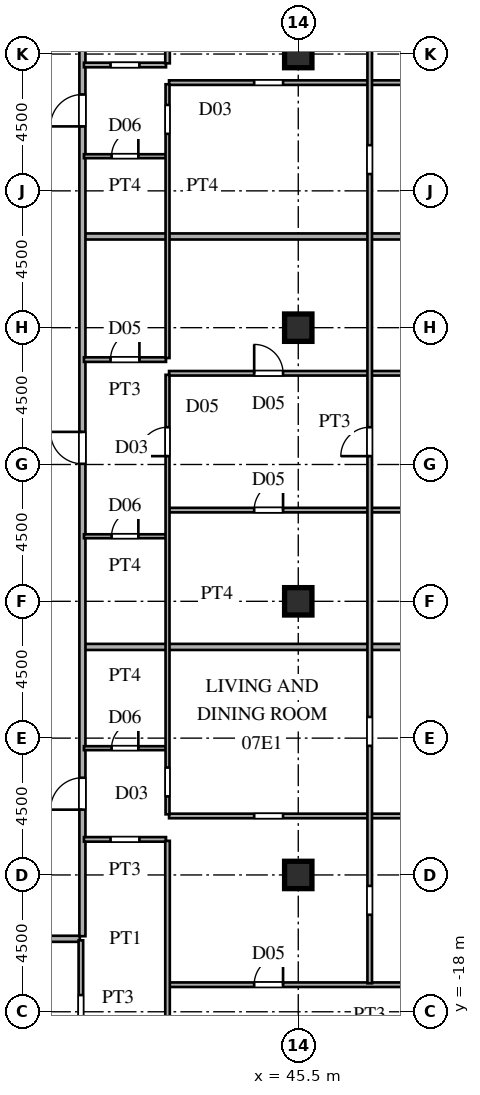
"""IFC4 building model, lengths in metres.
Left out: names, types, materials, properties, quantities, classifications, styles, units other than length and angle.
Written with IfcOpenShell. Run it as: python <this file> out.ifc"""

import sys

from ifc_helpers import new_model, si_unit, direction, frame, frame_2d, origin, origin_2d, place, context, subcontext, project, spatial, rectangle, i_section, extrude, source, transform, mapped, element, fill, save


model = new_model("IFC4")
c1 = context("Model", 3, precision=1e-05, world=origin(), true_north=direction((0.0, 1.0)))
c2 = subcontext(c1, "Body", "Model", "MODEL_VIEW")
j1 = project(units=[si_unit("LENGTHUNIT", "METRE"), si_unit("PLANEANGLEUNIT", "RADIAN")], contexts=[c1])
p1 = place(None, origin())
s1 = spatial("IfcSite", under=j1, at=p1, CompositionType="ELEMENT")
p2 = place(p1, origin())
s2 = spatial("IfcBuilding", under=s1, at=p2, CompositionType="ELEMENT")
p3 = place(p2, frame((0.0, 0.0, 29.7)))
s3 = spatial("IfcBuildingStorey", under=s2, at=p3, CompositionType="ELEMENT", Elevation=29.7)
m1 = source(origin(), c2, "Body", "SweptSolid", [
    extrude(i_section(OverallWidth=0.9, OverallDepth=0.9, WebThickness=0.036, FlangeThickness=0.055, at=origin_2d()), origin(), (0.0, 0.0, 1.0), 3.6),
])
for number, where, z_axis, x_axis in (
    (1, (45.5, -13.5, 0.0), (0.0, 0.0, 1.0), (1.0, 0.0, 0.0)),
    (2, (45.5, -4.5, 0.0), (0.0, 0.0, 1.0), (1.0, 0.0, 0.0)),
    (3, (45.5, 4.5, 0.0), (0.0, 0.0, 1.0), (1.0, 0.0, 0.0)),
    (4, (45.5, 13.5, 0.0), (0.0, 0.0, 1.0), (1.0, 0.0, 0.0)),
):
    element("IfcColumn", number, at=place(p3, frame(where, z_axis=z_axis, x_axis=x_axis)), inside=s3, PredefinedType="COLUMN", context=c2, shape_type="MappedRepresentation", body=[
        mapped(m1, transform((0.0, 0.0, 0.0), scale=1.0)),
    ])
p4 = place(p3, frame((41.25, -17.11, 0.0), z_axis=(0.0, 0.0, 1.0), x_axis=(1.0, 0.0, 0.0)))
e5 = element("IfcWall", 5, at=p4, inside=s3, PredefinedType="PARTITIONING", context=c2, shape_type="SweptSolid", body=[
    extrude(rectangle(XDim=13.2, YDim=0.15, at=frame_2d((6.6, 0.0))), origin(), (0.0, 0.0, 1.0), 3.38),
])
p5 = place(p4, frame((2.8, 0.0, 0.0)))
e6 = element("IfcOpeningElement", 6, at=p5, cuts=e5, PredefinedType="OPENING", context=c2, shape_type="SweptSolid", body=[
    extrude(rectangle(XDim=0.95, YDim=2.15, at=frame_2d((0.475, 1.075))), frame((0.0, 0.085, 0.0), z_axis=(0.0, -1.0, 0.0), x_axis=(1.0, 0.0, 0.0)), (0.0, 0.0, 1.0), 0.17),
])
p6 = place(p3, frame((36.585, -15.6, 0.0), z_axis=(0.0, 0.0, 1.0), x_axis=(1.0, 0.0, 0.0)))
e7 = element("IfcWall", 7, at=p6, inside=s3, PredefinedType="PARTITIONING", context=c2, shape_type="SweptSolid", body=[
    extrude(rectangle(XDim=1.73, YDim=0.2, at=frame_2d((0.865, 0.0))), origin(), (0.0, 0.0, 1.0), 3.38),
])
p7 = place(p3, frame((38.45, -12.33, 0.0), z_axis=(0.0, 0.0, 1.0), x_axis=(1.0, 0.0, 0.0)))
e8 = element("IfcWall", 8, at=p7, inside=s3, PredefinedType="PARTITIONING", context=c2, shape_type="SweptSolid", body=[
    extrude(rectangle(XDim=2.7, YDim=0.15, at=frame_2d((1.35, 0.0))), origin(), (0.0, 0.0, 1.0), 3.38),
])
p8 = place(p7, frame((0.875, 0.0, 0.0)))
e9 = element("IfcOpeningElement", 9, at=p8, cuts=e8, PredefinedType="OPENING", context=c2, shape_type="SweptSolid", body=[
    extrude(rectangle(XDim=0.95, YDim=2.15, at=frame_2d((0.475, 1.075))), frame((0.0, 0.085, 0.0), z_axis=(0.0, -1.0, 0.0), x_axis=(1.0, 0.0, 0.0)), (0.0, 0.0, 1.0), 0.17),
])
p9 = place(p3, frame((41.25, -11.56, 0.0), z_axis=(0.0, 0.0, 1.0), x_axis=(1.0, 0.0, 0.0)))
e10 = element("IfcWall", 10, at=p9, inside=s3, PredefinedType="PARTITIONING", context=c2, shape_type="SweptSolid", body=[
    extrude(rectangle(XDim=27.44, YDim=0.15, at=frame_2d((13.72, 0.0))), origin(), (0.0, 0.0, 1.0), 3.38),
])
p10 = place(p9, frame((2.8, 0.0, 0.0)))
e11 = element("IfcOpeningElement", 11, at=p10, cuts=e10, PredefinedType="OPENING", context=c2, shape_type="SweptSolid", body=[
    extrude(rectangle(XDim=0.95, YDim=2.15, at=frame_2d((0.475, 1.075))), frame((0.0, 0.085, 0.0), z_axis=(0.0, -1.0, 0.0), x_axis=(1.0, 0.0, 0.0)), (0.0, 0.0, 1.0), 0.17),
])
p11 = place(p9, frame((15.625, 0.0, 0.0)))
e12 = element("IfcOpeningElement", 12, at=p11, cuts=e10, PredefinedType="OPENING", context=c2, shape_type="SweptSolid", body=[
    extrude(rectangle(XDim=0.95, YDim=2.15, at=frame_2d((0.475, 1.075))), frame((0.0, 0.085, 0.0), z_axis=(0.0, -1.0, 0.0), x_axis=(1.0, 0.0, 0.0)), (0.0, 0.0, 1.0), 0.17),
])
p12 = place(p3, frame((38.45, -9.33, 0.0), z_axis=(0.0, 0.0, 1.0), x_axis=(1.0, 0.0, 0.0)))
e13 = element("IfcWall", 13, at=p12, inside=s3, PredefinedType="PARTITIONING", context=c2, shape_type="SweptSolid", body=[
    extrude(rectangle(XDim=2.7, YDim=0.13, at=frame_2d((1.35, 0.0))), origin(), (0.0, 0.0, 1.0), 3.38),
])
p13 = place(p12, frame((0.91, 0.0, 0.0)))
e14 = element("IfcOpeningElement", 14, at=p13, cuts=e13, PredefinedType="OPENING", context=c2, shape_type="SweptSolid", body=[
    extrude(rectangle(XDim=0.88, YDim=2.1, at=frame_2d((0.44, 1.05))), frame((0.0, 0.075, 0.0), z_axis=(0.0, -1.0, 0.0), x_axis=(1.0, 0.0, 0.0)), (0.0, 0.0, 1.0), 0.15),
])
p14 = place(p3, frame((38.48, -6.0, 0.0), z_axis=(0.0, 0.0, 1.0), x_axis=(1.0, 0.0, 0.0)))
e15 = element("IfcWall", 15, at=p14, inside=s3, PredefinedType="PARTITIONING", context=c2, shape_type="SweptSolid", body=[
    extrude(rectangle(XDim=34.025, YDim=0.2, at=frame_2d((17.012, 0.0))), origin(), (0.0, 0.0, 1.0), 3.38),
])
p15 = place(p3, frame((38.45, -2.36, 0.0), z_axis=(0.0, 0.0, 1.0), x_axis=(1.0, 0.0, 0.0)))
e16 = element("IfcWall", 16, at=p15, inside=s3, PredefinedType="PARTITIONING", context=c2, shape_type="SweptSolid", body=[
    extrude(rectangle(XDim=2.7, YDim=0.13, at=frame_2d((1.35, 0.0))), origin(), (0.0, 0.0, 1.0), 3.38),
])
p16 = place(p15, frame((0.91, 0.0, 0.0)))
e17 = element("IfcOpeningElement", 17, at=p16, cuts=e16, PredefinedType="OPENING", context=c2, shape_type="SweptSolid", body=[
    extrude(rectangle(XDim=0.88, YDim=2.1, at=frame_2d((0.44, 1.05))), frame((0.0, 0.075, 0.0), z_axis=(0.0, -1.0, 0.0), x_axis=(1.0, 0.0, 0.0)), (0.0, 0.0, 1.0), 0.15),
])
p17 = place(p3, frame((41.25, -1.5, 0.0), z_axis=(0.0, 0.0, 1.0), x_axis=(1.0, 0.0, 0.0)))
e18 = element("IfcWall", 18, at=p17, inside=s3, PredefinedType="PARTITIONING", context=c2, shape_type="SweptSolid", body=[
    extrude(rectangle(XDim=31.285, YDim=0.15, at=frame_2d((15.643, 0.0))), origin(), (0.0, 0.0, 1.0), 3.38),
])
p18 = place(p17, frame((2.8, 0.0, 0.0)))
e19 = element("IfcOpeningElement", 19, at=p18, cuts=e18, PredefinedType="OPENING", context=c2, shape_type="SweptSolid", body=[
    extrude(rectangle(XDim=0.95, YDim=2.15, at=frame_2d((0.475, 1.075))), frame((0.0, 0.085, 0.0), z_axis=(0.0, -1.0, 0.0), x_axis=(1.0, 0.0, 0.0)), (0.0, 0.0, 1.0), 0.17),
])
p19 = place(p17, frame((15.625, 0.0, 0.0)))
e20 = element("IfcOpeningElement", 20, at=p19, cuts=e18, PredefinedType="OPENING", context=c2, shape_type="SweptSolid", body=[
    extrude(rectangle(XDim=0.95, YDim=2.15, at=frame_2d((0.475, 1.075))), frame((0.0, 0.085, 0.0), z_axis=(0.0, -1.0, 0.0), x_axis=(1.0, 0.0, 0.0)), (0.0, 0.0, 1.0), 0.17),
])
p20 = place(p3, frame((41.25, 3.0, 0.0), z_axis=(0.0, 0.0, 1.0), x_axis=(1.0, 0.0, 0.0)))
e21 = element("IfcWall", 21, at=p20, inside=s3, PredefinedType="PARTITIONING", context=c2, shape_type="SweptSolid", body=[
    extrude(rectangle(XDim=31.285, YDim=0.15, at=frame_2d((15.643, 0.0))), origin(), (0.0, 0.0, 1.0), 3.38),
])
p21 = place(p20, frame((2.8, 0.0, 0.0)))
e22 = element("IfcOpeningElement", 22, at=p21, cuts=e21, PredefinedType="OPENING", context=c2, shape_type="SweptSolid", body=[
    extrude(rectangle(XDim=0.95, YDim=2.15, at=frame_2d((0.475, 1.075))), frame((0.0, 0.085, 0.0), z_axis=(0.0, -1.0, 0.0), x_axis=(1.0, 0.0, 0.0)), (0.0, 0.0, 1.0), 0.17),
])
p22 = place(p20, frame((15.625, 0.0, 0.0)))
e23 = element("IfcOpeningElement", 23, at=p22, cuts=e21, PredefinedType="OPENING", context=c2, shape_type="SweptSolid", body=[
    extrude(rectangle(XDim=0.95, YDim=2.15, at=frame_2d((0.475, 1.075))), frame((0.0, 0.085, 0.0), z_axis=(0.0, -1.0, 0.0), x_axis=(1.0, 0.0, 0.0)), (0.0, 0.0, 1.0), 0.17),
])
p23 = place(p3, frame((38.45, 3.45, 0.0), z_axis=(0.0, 0.0, 1.0), x_axis=(1.0, 0.0, 0.0)))
e24 = element("IfcWall", 24, at=p23, inside=s3, PredefinedType="PARTITIONING", context=c2, shape_type="SweptSolid", body=[
    extrude(rectangle(XDim=2.7, YDim=0.15, at=frame_2d((1.35, 0.0))), origin(), (0.0, 0.0, 1.0), 3.38),
])
p24 = place(p23, frame((0.875, 0.0, 0.0)))
e25 = element("IfcOpeningElement", 25, at=p24, cuts=e24, PredefinedType="OPENING", context=c2, shape_type="SweptSolid", body=[
    extrude(rectangle(XDim=0.95, YDim=2.15, at=frame_2d((0.475, 1.075))), frame((0.0, 0.085, 0.0), z_axis=(0.0, -1.0, 0.0), x_axis=(1.0, 0.0, 0.0)), (0.0, 0.0, 1.0), 0.17),
])
p25 = place(p3, frame((38.48, 7.5, 0.0), z_axis=(0.0, 0.0, 1.0), x_axis=(1.0, 0.0, 0.0)))
e26 = element("IfcWall", 26, at=p25, inside=s3, PredefinedType="PARTITIONING", context=c2, shape_type="SweptSolid", body=[
    extrude(rectangle(XDim=34.025, YDim=0.2, at=frame_2d((17.012, 0.0))), origin(), (0.0, 0.0, 1.0), 3.38),
])
p26 = place(p3, frame((38.45, 10.14, 0.0), z_axis=(0.0, 0.0, 1.0), x_axis=(1.0, 0.0, 0.0)))
e27 = element("IfcWall", 27, at=p26, inside=s3, PredefinedType="PARTITIONING", context=c2, shape_type="SweptSolid", body=[
    extrude(rectangle(XDim=2.7, YDim=0.13, at=frame_2d((1.35, 0.0))), origin(), (0.0, 0.0, 1.0), 3.38),
])
p27 = place(p26, frame((0.91, 0.0, 0.0)))
e28 = element("IfcOpeningElement", 28, at=p27, cuts=e27, PredefinedType="OPENING", context=c2, shape_type="SweptSolid", body=[
    extrude(rectangle(XDim=0.88, YDim=2.1, at=frame_2d((0.44, 1.05))), frame((0.0, 0.075, 0.0), z_axis=(0.0, -1.0, 0.0), x_axis=(1.0, 0.0, 0.0)), (0.0, 0.0, 1.0), 0.15),
])
p28 = place(p3, frame((41.25, 12.56, 0.0), z_axis=(0.0, 0.0, 1.0), x_axis=(1.0, 0.0, 0.0)))
e29 = element("IfcWall", 29, at=p28, inside=s3, PredefinedType="PARTITIONING", context=c2, shape_type="SweptSolid", body=[
    extrude(rectangle(XDim=24.969, YDim=0.15, at=frame_2d((12.484, 0.0))), origin(), (0.0, 0.0, 1.0), 3.38),
])
p29 = place(p28, frame((2.8, 0.0, 0.0)))
e30 = element("IfcOpeningElement", 30, at=p29, cuts=e29, PredefinedType="OPENING", context=c2, shape_type="SweptSolid", body=[
    extrude(rectangle(XDim=0.95, YDim=2.15, at=frame_2d((0.475, 1.075))), frame((0.0, 0.085, 0.0), z_axis=(0.0, -1.0, 0.0), x_axis=(1.0, 0.0, 0.0)), (0.0, 0.0, 1.0), 0.17),
])
p30 = place(p28, frame((15.625, 0.0, 0.0)))
e31 = element("IfcOpeningElement", 31, at=p30, cuts=e29, PredefinedType="OPENING", context=c2, shape_type="SweptSolid", body=[
    extrude(rectangle(XDim=0.95, YDim=2.15, at=frame_2d((0.475, 1.075))), frame((0.0, 0.085, 0.0), z_axis=(0.0, -1.0, 0.0), x_axis=(1.0, 0.0, 0.0)), (0.0, 0.0, 1.0), 0.17),
])
p31 = place(p28, frame((9.45, 0.0, 0.0)))
e32 = element("IfcOpeningElement", 32, at=p31, cuts=e29, PredefinedType="OPENING", context=c2, shape_type="SweptSolid", body=[
    extrude(rectangle(XDim=0.95, YDim=2.15, at=frame_2d((0.475, 1.075))), frame((0.0, 0.085, 0.0), z_axis=(0.0, -1.0, 0.0), x_axis=(1.0, 0.0, 0.0)), (0.0, 0.0, 1.0), 0.17),
])
p32 = place(p3, frame((38.45, 13.14, 0.0), z_axis=(0.0, 0.0, 1.0), x_axis=(1.0, 0.0, 0.0)))
e33 = element("IfcWall", 33, at=p32, inside=s3, PredefinedType="PARTITIONING", context=c2, shape_type="SweptSolid", body=[
    extrude(rectangle(XDim=2.7, YDim=0.15, at=frame_2d((1.35, 0.0))), origin(), (0.0, 0.0, 1.0), 3.38),
])
p33 = place(p32, frame((0.875, 0.0, 0.0)))
e34 = element("IfcOpeningElement", 34, at=p33, cuts=e33, PredefinedType="OPENING", context=c2, shape_type="SweptSolid", body=[
    extrude(rectangle(XDim=0.95, YDim=2.15, at=frame_2d((0.475, 1.075))), frame((0.0, 0.085, 0.0), z_axis=(0.0, -1.0, 0.0), x_axis=(1.0, 0.0, 0.0)), (0.0, 0.0, 1.0), 0.17),
])
p34 = place(p3, frame((38.35, -23.858, 0.0), z_axis=(0.0, 0.0, 1.0), x_axis=(0.0, 1.0, 0.0)))
e35 = element("IfcWall", 35, at=p34, inside=s3, PredefinedType="PARTITIONING", context=c2, shape_type="SweptSolid", body=[
    extrude(rectangle(XDim=8.208, YDim=0.15, at=frame_2d((4.104, 0.0))), origin(), (0.0, 0.0, 1.0), 3.38),
])
p35 = place(p34, frame((1.347, 0.0, 0.0)))
e36 = element("IfcOpeningElement", 36, at=p35, cuts=e35, PredefinedType="OPENING", context=c2, shape_type="SweptSolid", body=[
    extrude(rectangle(XDim=0.95, YDim=2.15, at=frame_2d((0.475, 1.075))), frame((0.0, 0.085, 0.0), z_axis=(0.0, -1.0, 0.0), x_axis=(1.0, 0.0, 0.0)), (0.0, 0.0, 1.0), 0.17),
])
p36 = place(p34, frame((5.458, 0.0, 0.0)))
e37 = element("IfcOpeningElement", 37, at=p36, cuts=e35, PredefinedType="OPENING", context=c2, shape_type="SweptSolid", body=[
    extrude(rectangle(XDim=0.95, YDim=2.15, at=frame_2d((0.475, 1.075))), frame((0.0, 0.085, 0.0), z_axis=(0.0, -1.0, 0.0), x_axis=(1.0, 0.0, 0.0)), (0.0, 0.0, 1.0), 0.17),
])
p37 = place(p3, frame((38.4, -15.515, 0.0), z_axis=(0.0, 0.0, 1.0), x_axis=(0.0, 1.0, 0.0)))
e38 = element("IfcWall", 38, at=p37, inside=s3, PredefinedType="PARTITIONING", context=c2, shape_type="SweptSolid", body=[
    extrude(rectangle(XDim=31.03, YDim=0.2, at=frame_2d((15.515, 0.0))), origin(), (0.0, 0.0, 1.0), 3.38),
])
p38 = place(p37, frame((4.163, 0.0, 0.0)))
e39 = element("IfcOpeningElement", 39, at=p38, cuts=e38, PredefinedType="OPENING", context=c2, shape_type="SweptSolid", body=[
    extrude(rectangle(XDim=1.05, YDim=2.25, at=frame_2d((0.525, 1.125))), frame((0.0, 0.11, 0.0), z_axis=(0.0, -1.0, 0.0), x_axis=(1.0, 0.0, 0.0)), (0.0, 0.0, 1.0), 0.22),
])
p39 = place(p37, frame((15.538, 0.0, 0.0)))
e40 = element("IfcOpeningElement", 40, at=p39, cuts=e38, PredefinedType="OPENING", context=c2, shape_type="SweptSolid", body=[
    extrude(rectangle(XDim=1.05, YDim=2.25, at=frame_2d((0.525, 1.125))), frame((0.0, 0.11, 0.0), z_axis=(0.0, -1.0, 0.0), x_axis=(1.0, 0.0, 0.0)), (0.0, 0.0, 1.0), 0.22),
])
p40 = place(p37, frame((26.635, 0.0, 0.0)))
e41 = element("IfcOpeningElement", 41, at=p40, cuts=e38, PredefinedType="OPENING", context=c2, shape_type="SweptSolid", body=[
    extrude(rectangle(XDim=1.05, YDim=2.25, at=frame_2d((0.525, 1.125))), frame((0.0, 0.11, 0.0), z_axis=(0.0, -1.0, 0.0), x_axis=(1.0, 0.0, 0.0)), (0.0, 0.0, 1.0), 0.22),
])
p41 = place(p3, frame((41.2, -22.704, 0.0), z_axis=(0.0, 0.0, 1.0), x_axis=(0.0, 1.0, 0.0)))
e42 = element("IfcWall", 42, at=p41, inside=s3, PredefinedType="PARTITIONING", context=c2, shape_type="SweptSolid", body=[
    extrude(rectangle(XDim=10.326, YDim=0.15, at=frame_2d((5.163, 0.0))), origin(), (0.0, 0.0, 1.0), 3.38),
])
p42 = place(p3, frame((41.2, -11.506, 0.0), z_axis=(0.0, 0.0, 1.0), x_axis=(0.0, 1.0, 0.0)))
e43 = element("IfcWall", 43, at=p42, inside=s3, PredefinedType="PARTITIONING", context=c2, shape_type="SweptSolid", body=[
    extrude(rectangle(XDim=14.456, YDim=0.13, at=frame_2d((7.228, 0.0))), origin(), (0.0, 0.0, 1.0), 3.38),
])
p43 = place(p42, frame((0.589, 0.0, 0.0)))
e44 = element("IfcOpeningElement", 44, at=p43, cuts=e43, PredefinedType="OPENING", context=c2, shape_type="SweptSolid", body=[
    extrude(rectangle(XDim=0.95, YDim=2.15, at=frame_2d((0.475, 1.075))), frame((0.0, 0.075, 0.0), z_axis=(0.0, -1.0, 0.0), x_axis=(1.0, 0.0, 0.0)), (0.0, 0.0, 1.0), 0.15),
])
p44 = place(p42, frame((11.781, 0.0, 0.0)))
e45 = element("IfcOpeningElement", 45, at=p44, cuts=e43, PredefinedType="OPENING", context=c2, shape_type="SweptSolid", body=[
    extrude(rectangle(XDim=0.95, YDim=2.15, at=frame_2d((0.475, 1.075))), frame((0.0, 0.075, 0.0), z_axis=(0.0, -1.0, 0.0), x_axis=(1.0, 0.0, 0.0)), (0.0, 0.0, 1.0), 0.15),
])
p45 = place(p3, frame((41.2, 3.502, 0.0), z_axis=(0.0, 0.0, 1.0), x_axis=(0.0, 1.0, 0.0)))
e46 = element("IfcWall", 46, at=p45, inside=s3, PredefinedType="PARTITIONING", context=c2, shape_type="SweptSolid", body=[
    extrude(rectangle(XDim=9.004, YDim=0.13, at=frame_2d((4.502, 0.0))), origin(), (0.0, 0.0, 1.0), 3.38),
])
p46 = place(p45, frame((7.374, 0.0, 0.0)))
e47 = element("IfcOpeningElement", 47, at=p46, cuts=e46, PredefinedType="OPENING", context=c2, shape_type="SweptSolid", body=[
    extrude(rectangle(XDim=0.95, YDim=2.15, at=frame_2d((0.475, 1.075))), frame((0.0, 0.075, 0.0), z_axis=(0.0, -1.0, 0.0), x_axis=(1.0, 0.0, 0.0)), (0.0, 0.0, 1.0), 0.15),
])
p47 = place(p3, frame((41.2, 13.195, 0.0), z_axis=(0.0, 0.0, 1.0), x_axis=(0.0, 1.0, 0.0)))
e48 = element("IfcWall", 48, at=p47, inside=s3, PredefinedType="PARTITIONING", context=c2, shape_type="SweptSolid", body=[
    extrude(rectangle(XDim=9.509, YDim=0.15, at=frame_2d((4.754, 0.0))), origin(), (0.0, 0.0, 1.0), 3.38),
])
p48 = place(p3, frame((47.85, -17.063, 0.0), z_axis=(0.0, 0.0, 1.0), x_axis=(0.0, 1.0, 0.0)))
e49 = element("IfcWall", 49, at=p48, inside=s3, PredefinedType="PARTITIONING", context=c2, shape_type="SweptSolid", body=[
    extrude(rectangle(XDim=34.626, YDim=0.15, at=frame_2d((17.313, 0.0))), origin(), (0.0, 0.0, 1.0), 3.38),
])
p49 = place(p48, frame((7.81, 0.0, 0.0)))
e50 = element("IfcOpeningElement", 50, at=p49, cuts=e49, PredefinedType="OPENING", context=c2, shape_type="SweptSolid", body=[
    extrude(rectangle(XDim=0.95, YDim=2.15, at=frame_2d((0.475, 1.075))), frame((0.0, 0.085, 0.0), z_axis=(0.0, -1.0, 0.0), x_axis=(1.0, 0.0, 0.0)), (0.0, 0.0, 1.0), 0.17),
])
p50 = place(p48, frame((2.253, 0.0, 0.0)))
e51 = element("IfcOpeningElement", 51, at=p50, cuts=e49, PredefinedType="OPENING", context=c2, shape_type="SweptSolid", body=[
    extrude(rectangle(XDim=0.95, YDim=2.15, at=frame_2d((0.475, 1.075))), frame((0.0, 0.085, 0.0), z_axis=(0.0, -1.0, 0.0), x_axis=(1.0, 0.0, 0.0)), (0.0, 0.0, 1.0), 0.17),
])
p51 = place(p48, frame((17.338, 0.0, 0.0)))
e52 = element("IfcOpeningElement", 52, at=p51, cuts=e49, PredefinedType="OPENING", context=c2, shape_type="SweptSolid", body=[
    extrude(rectangle(XDim=0.95, YDim=2.15, at=frame_2d((0.475, 1.075))), frame((0.0, 0.085, 0.0), z_axis=(0.0, -1.0, 0.0), x_axis=(1.0, 0.0, 0.0)), (0.0, 0.0, 1.0), 0.17),
])
p52 = place(p48, frame((26.616, 0.0, 0.0)))
e53 = element("IfcOpeningElement", 53, at=p52, cuts=e49, PredefinedType="OPENING", context=c2, shape_type="SweptSolid", body=[
    extrude(rectangle(XDim=0.95, YDim=2.15, at=frame_2d((0.475, 1.075))), frame((0.0, 0.085, 0.0), z_axis=(0.0, -1.0, 0.0), x_axis=(1.0, 0.0, 0.0)), (0.0, 0.0, 1.0), 0.17),
])
m2 = source(origin(), c2, "Body", "SweptSolid", [
    extrude(rectangle(XDim=0.95, YDim=2.15, at=frame_2d((0.475, 1.075))), frame((0.0, 0.025, 0.0), z_axis=(0.0, -1.0, 0.0), x_axis=(1.0, 0.0, 0.0)), (0.0, 0.0, 1.0), 0.05),
])
p53 = place(p5, origin())
e54 = element("IfcDoor", 54, at=p53, inside=s3, OperationType="SINGLE_SWING_RIGHT", PredefinedType="DOOR", context=c2, shape_type="MappedRepresentation", body=[
    mapped(m2, transform((0.0, 0.0, 0.0), scale=1.0)),
])
fill(e6, e54)
m3 = source(origin(), c2, "Body", "SweptSolid", [
    extrude(rectangle(XDim=0.88, YDim=2.1, at=frame_2d((0.44, 1.05))), frame((0.0, 0.025, 0.0), z_axis=(0.0, -1.0, 0.0), x_axis=(1.0, 0.0, 0.0)), (0.0, 0.0, 1.0), 0.05),
])
p54 = place(p13, origin())
e55 = element("IfcDoor", 55, at=p54, inside=s3, OperationType="SINGLE_SWING_RIGHT", PredefinedType="DOOR", context=c2, shape_type="MappedRepresentation", body=[
    mapped(m3, transform((0.0, 0.0, 0.0), scale=1.0)),
])
fill(e14, e55)
p55 = place(p16, origin())
e56 = element("IfcDoor", 56, at=p55, inside=s3, OperationType="SINGLE_SWING_RIGHT", PredefinedType="DOOR", context=c2, shape_type="MappedRepresentation", body=[
    mapped(m3, transform((0.0, 0.0, 0.0), scale=1.0)),
])
fill(e17, e56)
p56 = place(p18, origin())
e57 = element("IfcDoor", 57, at=p56, inside=s3, OperationType="SINGLE_SWING_RIGHT", PredefinedType="DOOR", context=c2, shape_type="MappedRepresentation", body=[
    mapped(m2, transform((0.0, 0.0, 0.0), scale=1.0)),
])
fill(e19, e57)
p57 = place(p21, origin())
e58 = element("IfcDoor", 58, at=p57, inside=s3, OperationType="SINGLE_SWING_LEFT", PredefinedType="DOOR", context=c2, shape_type="MappedRepresentation", body=[
    mapped(m2, transform((0.0, 0.0, 0.0), scale=1.0)),
])
fill(e22, e58)
p58 = place(p24, origin())
e59 = element("IfcDoor", 59, at=p58, inside=s3, OperationType="SINGLE_SWING_RIGHT", PredefinedType="DOOR", context=c2, shape_type="MappedRepresentation", body=[
    mapped(m2, transform((0.0, 0.0, 0.0), scale=1.0)),
])
fill(e25, e59)
p59 = place(p27, origin())
e60 = element("IfcDoor", 60, at=p59, inside=s3, OperationType="SINGLE_SWING_RIGHT", PredefinedType="DOOR", context=c2, shape_type="MappedRepresentation", body=[
    mapped(m3, transform((0.0, 0.0, 0.0), scale=1.0)),
])
fill(e28, e60)
m4 = source(origin(), c2, "Body", "SweptSolid", [
    extrude(rectangle(XDim=1.05, YDim=2.25, at=frame_2d((0.525, 1.125))), frame((0.0, 0.025, 0.0), z_axis=(0.0, -1.0, 0.0), x_axis=(1.0, 0.0, 0.0)), (0.0, 0.0, 1.0), 0.05),
])
p60 = place(p38, origin())
e61 = element("IfcDoor", 61, at=p60, inside=s3, OperationType="SINGLE_SWING_LEFT", PredefinedType="DOOR", context=c2, shape_type="MappedRepresentation", body=[
    mapped(m4, transform((0.0, 0.0, 0.0), scale=1.0)),
])
fill(e39, e61)
p61 = place(p39, origin())
e62 = element("IfcDoor", 62, at=p61, inside=s3, OperationType="SINGLE_SWING_RIGHT", PredefinedType="DOOR", context=c2, shape_type="MappedRepresentation", body=[
    mapped(m4, transform((0.0, 0.0, 0.0), scale=1.0)),
])
fill(e40, e62)
p62 = place(p40, origin())
e63 = element("IfcDoor", 63, at=p62, inside=s3, OperationType="SINGLE_SWING_LEFT", PredefinedType="DOOR", context=c2, shape_type="MappedRepresentation", body=[
    mapped(m4, transform((0.0, 0.0, 0.0), scale=1.0)),
])
fill(e41, e63)
p63 = place(p44, origin())
e64 = element("IfcDoor", 64, at=p63, inside=s3, OperationType="SINGLE_SWING_LEFT", PredefinedType="DOOR", context=c2, shape_type="MappedRepresentation", body=[
    mapped(m2, transform((0.0, 0.0, 0.0), scale=1.0)),
])
fill(e45, e64)
p64 = place(p51, origin())
e65 = element("IfcDoor", 65, at=p64, inside=s3, OperationType="SINGLE_SWING_LEFT", PredefinedType="DOOR", context=c2, shape_type="MappedRepresentation", body=[
    mapped(m2, transform((0.0, 0.0, 0.0), scale=1.0)),
])
fill(e52, e65)
save(model, sys.argv[1])
